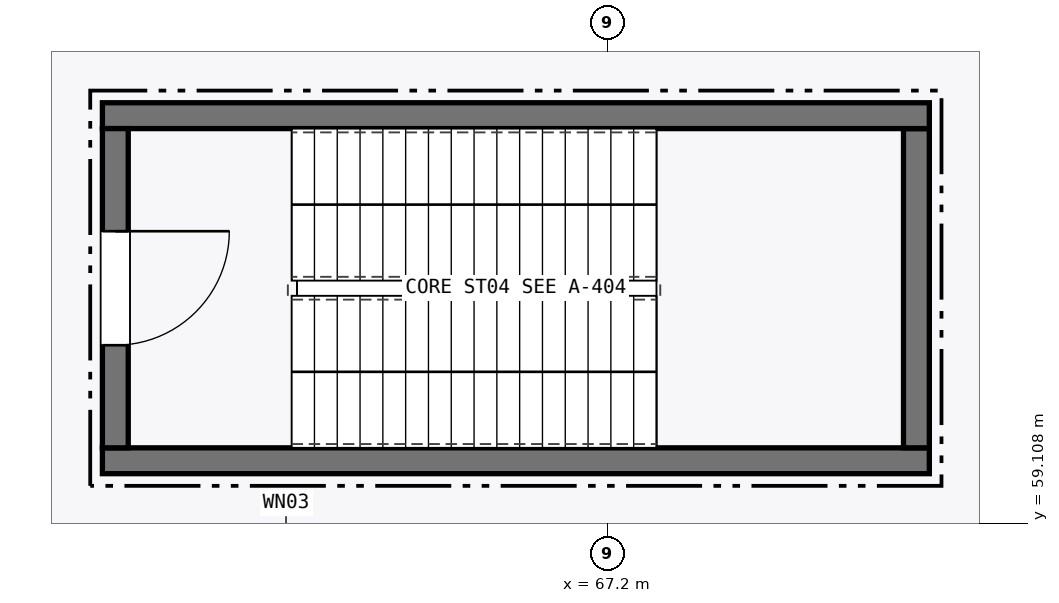
"""IFC4 building model, lengths in metres.
Left out: names, types, materials, properties, quantities, classifications, styles, units other than length and angle.
Written with IfcOpenShell. Run it as: python <this file> out.ifc"""

import sys

from ifc_helpers import new_model, si_unit, direction, frame, frame_2d, origin, place, context, subcontext, project, spatial, rectangle, extrude, element, fill, save


model = new_model("IFC4")
c1 = context("Model", 3, precision=1e-05, world=origin(), true_north=direction((0.0, 1.0)))
c2 = subcontext(c1, "Body", "Model", "MODEL_VIEW")
j1 = project(units=[si_unit("LENGTHUNIT", "METRE"), si_unit("PLANEANGLEUNIT", "RADIAN")], contexts=[c1])
p1 = place(None, origin())
s1 = spatial("IfcSite", under=j1, at=p1, CompositionType="ELEMENT")
p2 = place(p1, origin())
s2 = spatial("IfcBuilding", under=s1, at=p2, CompositionType="ELEMENT")
p3 = place(p2, frame((0.0, 0.0, 16.5)))
s3 = spatial("IfcBuildingStorey", under=s2, at=p3, CompositionType="ELEMENT", Elevation=16.5)
p4 = place(p3, frame((60.56, 59.93, 0.0), z_axis=(0.0, 0.0, 1.0), x_axis=(1.0, 0.0, 0.0)))
e1 = element("IfcWall", 1, at=p4, inside=s3, PredefinedType="SHEAR", context=c2, shape_type="SweptSolid", body=[
    extrude(rectangle(XDim=10.88, YDim=0.34, at=frame_2d((5.44, 0.0))), origin(), (0.0, 0.0, 1.0), 4.845),
])
p5 = place(p3, frame((71.27, 60.1, 0.0), z_axis=(0.0, 0.0, 1.0), x_axis=(0.0, 1.0, 0.0)))
e2 = element("IfcWall", 2, at=p5, inside=s3, PredefinedType="SHEAR", context=c2, shape_type="SweptSolid", body=[
    extrude(rectangle(XDim=4.2, YDim=0.34, at=frame_2d((2.1, 0.0))), origin(), (0.0, 0.0, 1.0), 4.845),
])
p6 = place(p3, frame((71.44, 64.47, 0.0), z_axis=(0.0, 0.0, 1.0), x_axis=(-1.0, 0.0, 0.0)))
e3 = element("IfcWall", 3, at=p6, inside=s3, PredefinedType="SHEAR", context=c2, shape_type="SweptSolid", body=[
    extrude(rectangle(XDim=10.88, YDim=0.34, at=frame_2d((5.44, 0.0))), origin(), (0.0, 0.0, 1.0), 4.845),
])
p7 = place(p3, frame((60.73, 64.3, 0.0), z_axis=(0.0, 0.0, 1.0), x_axis=(0.0, -1.0, 0.0)))
e4 = element("IfcWall", 4, at=p7, inside=s3, PredefinedType="SHEAR", context=c2, shape_type="SweptSolid", body=[
    extrude(rectangle(XDim=4.2, YDim=0.34, at=frame_2d((2.1, 0.0))), origin(), (0.0, 0.0, 1.0), 4.845),
])
p8 = place(p7, frame((1.35, 0.0, 0.0)))
e5 = element("IfcOpeningElement", 5, at=p8, cuts=e4, PredefinedType="OPENING", context=c2, shape_type="SweptSolid", body=[
    extrude(rectangle(XDim=1.5, YDim=2.15, at=frame_2d((0.75, 1.075))), frame((0.0, 0.18, 0.0), z_axis=(0.0, -1.0, 0.0), x_axis=(1.0, 0.0, 0.0)), (0.0, 0.0, 1.0), 0.36),
])
p9 = place(p8, origin())
e6 = element("IfcDoor", 6, at=p9, inside=s3, OperationType="SINGLE_SWING_LEFT", PredefinedType="DOOR", context=c2, shape_type="SweptSolid", body=[
    extrude(rectangle(XDim=1.5, YDim=2.15, at=frame_2d((0.75, 1.075))), frame((0.0, 0.025, 0.0), z_axis=(0.0, -1.0, 0.0), x_axis=(1.0, 0.0, 0.0)), (0.0, 0.0, 1.0), 0.05),
])
fill(e5, e6)
save(model, sys.argv[1])
